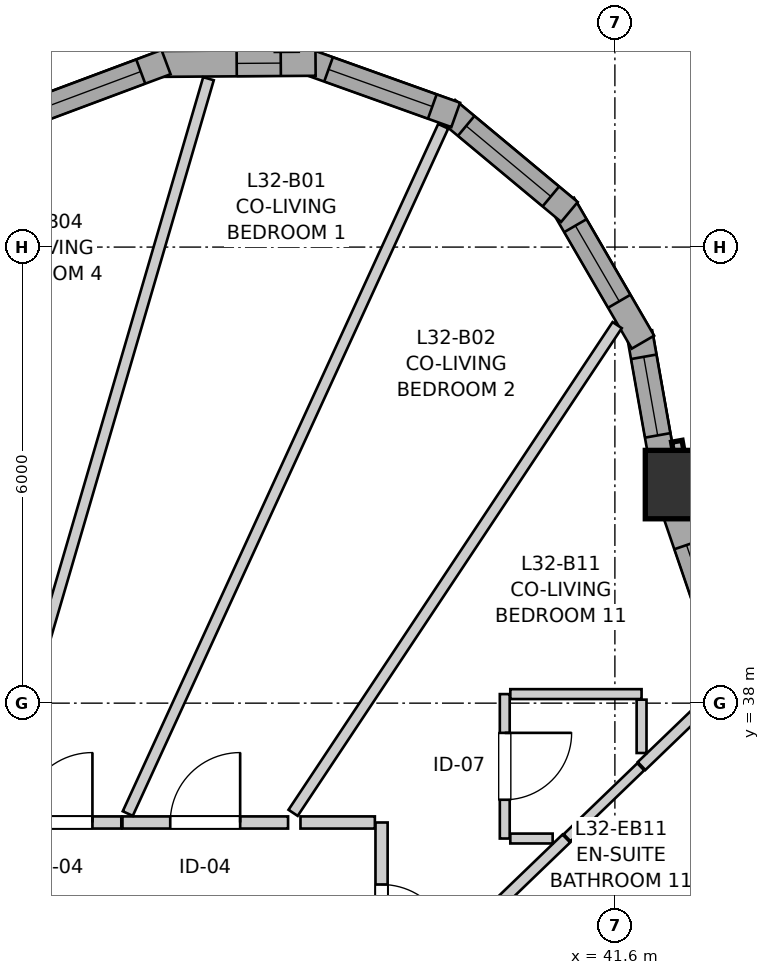
"""IFC4 building model, lengths in metres.
Left out: names, types, materials, properties, quantities, classifications, styles, units other than length and angle.
Written with IfcOpenShell. Run it as: python <this file> out.ifc"""

import sys

from ifc_helpers import new_model, si_unit, direction, frame, frame_2d, origin, origin_2d, place, context, subcontext, project, spatial, rectangle, extrude, source, transform, mapped, element, fill, save


model = new_model("IFC4")
c1 = context("Model", 3, precision=1e-05, world=origin(), true_north=direction((0.0, 1.0)))
c2 = subcontext(c1, "Body", "Model", "MODEL_VIEW")
j1 = project(units=[si_unit("LENGTHUNIT", "METRE"), si_unit("PLANEANGLEUNIT", "RADIAN")], contexts=[c1])
p1 = place(None, origin())
s1 = spatial("IfcSite", under=j1, at=p1, CompositionType="ELEMENT")
p2 = place(p1, origin())
s2 = spatial("IfcBuilding", under=s1, at=p2, CompositionType="ELEMENT")
p3 = place(p2, frame((0.0, 0.0, 108.8)))
s3 = spatial("IfcBuildingStorey", under=s2, at=p3, CompositionType="ELEMENT", Elevation=108.8)
m1 = source(origin(), c2, "Body", "SweptSolid", [
    extrude(rectangle(XDim=0.9, YDim=0.9, at=origin_2d()), origin(), (0.0, 0.0, 1.0), 2.935),
])
p4 = place(p3, frame((42.45, 40.875, 0.0), z_axis=(0.0, 0.0, 1.0), x_axis=(1.0, 0.0, 0.0)))
e1 = element("IfcColumn", 1, at=p4, inside=s3, PredefinedType="COLUMN", context=c2, shape_type="MappedRepresentation", body=[
    mapped(m1, transform((0.0, 0.0, 0.0), x_axis=(1.0, 0.0, 0.0), y_axis=(0.0, 1.0, 0.0), z_axis=(0.0, 0.0, 1.0), scale=1.0)),
])
p5 = place(p3, frame((43.319, 37.809, 0.0), z_axis=(0.0, 0.0, 1.0), x_axis=(-0.323586371726, 0.946198636669, 0.0)))
e2 = element("IfcWall", 2, at=p5, inside=s3, PredefinedType="SOLIDWALL", context=c2, shape_type="SweptSolid", body=[
    extrude(rectangle(XDim=2.952, YDim=0.34, at=frame_2d((1.476, 0.0))), origin(), (0.0, 0.0, 1.0), 2.465),
])
p6 = place(p5, frame((0.949, 0.0, 0.82)))
e3 = element("IfcOpeningElement", 3, at=p6, cuts=e2, PredefinedType="OPENING", context=c2, shape_type="SweptSolid", body=[
    extrude(rectangle(XDim=1.45, YDim=1.25, at=frame_2d((0.725, 0.625))), frame((0.0, 0.18, 0.0), z_axis=(0.0, -1.0, 0.0), x_axis=(1.0, 0.0, 0.0)), (0.0, 0.0, 1.0), 0.36),
])
p7 = place(p3, frame((42.242, 41.072, 0.0), z_axis=(0.0, 0.0, 1.0), x_axis=(-0.17440141227, 0.984674640375, 0.0)))
e4 = element("IfcWall", 4, at=p7, inside=s3, PredefinedType="SOLIDWALL", context=c2, shape_type="SweptSolid", body=[
    extrude(rectangle(XDim=1.831, YDim=0.34, at=frame_2d((0.916, 0.0))), origin(), (0.0, 0.0, 1.0), 2.465),
])
p8 = place(p7, frame((0.457, 0.0, 0.82)))
e5 = element("IfcOpeningElement", 5, at=p8, cuts=e4, PredefinedType="OPENING", context=c2, shape_type="SweptSolid", body=[
    extrude(rectangle(XDim=1.05, YDim=1.45, at=frame_2d((0.525, 0.725))), frame((0.0, 0.18, 0.0), z_axis=(0.0, -1.0, 0.0), x_axis=(1.0, 0.0, 0.0)), (0.0, 0.0, 1.0), 0.36),
])
p9 = place(p3, frame((41.969, 42.749, 0.0), z_axis=(0.0, 0.0, 1.0), x_axis=(-0.501989603552, 0.864873654313, 0.0)))
e6 = element("IfcWall", 6, at=p9, inside=s3, PredefinedType="SOLIDWALL", context=c2, shape_type="SweptSolid", body=[
    extrude(rectangle(XDim=2.099, YDim=0.34, at=frame_2d((1.05, 0.0))), origin(), (0.0, 0.0, 1.0), 2.465),
])
p10 = place(p9, frame((0.622, 0.0, 0.82)))
e7 = element("IfcOpeningElement", 7, at=p10, cuts=e6, PredefinedType="OPENING", context=c2, shape_type="SweptSolid", body=[
    extrude(rectangle(XDim=1.15, YDim=1.2, at=frame_2d((0.575, 0.6))), frame((0.0, 0.18, 0.0), z_axis=(0.0, -1.0, 0.0), x_axis=(1.0, 0.0, 0.0)), (0.0, 0.0, 1.0), 0.36),
])
p11 = place(p3, frame((41.002, 44.462, 0.0), z_axis=(0.0, 0.0, 1.0), x_axis=(-0.768488123124, 0.639864051669, 0.0)))
e8 = element("IfcWall", 8, at=p11, inside=s3, PredefinedType="SOLIDWALL", context=c2, shape_type="SweptSolid", body=[
    extrude(rectangle(XDim=2.099, YDim=0.34, at=frame_2d((1.05, 0.0))), origin(), (0.0, 0.0, 1.0), 2.465),
])
p12 = place(p11, frame((0.319, 0.0, 0.82)))
e9 = element("IfcOpeningElement", 9, at=p12, cuts=e8, PredefinedType="OPENING", context=c2, shape_type="SweptSolid", body=[
    extrude(rectangle(XDim=1.45, YDim=1.25, at=frame_2d((0.725, 0.625))), frame((0.0, 0.18, 0.0), z_axis=(0.0, -1.0, 0.0), x_axis=(1.0, 0.0, 0.0)), (0.0, 0.0, 1.0), 0.36),
])
p13 = place(p3, frame((39.506, 45.739, 0.0), z_axis=(0.0, 0.0, 1.0), x_axis=(-0.941486401639, 0.33705096874, 0.0)))
e10 = element("IfcWall", 10, at=p13, inside=s3, PredefinedType="SOLIDWALL", context=c2, shape_type="SweptSolid", body=[
    extrude(rectangle(XDim=2.099, YDim=0.34, at=frame_2d((1.05, 0.0))), origin(), (0.0, 0.0, 1.0), 2.465),
])
p14 = place(p13, frame((0.327, 0.0, 0.82)))
e11 = element("IfcOpeningElement", 11, at=p14, cuts=e10, PredefinedType="OPENING", context=c2, shape_type="SweptSolid", body=[
    extrude(rectangle(XDim=1.45, YDim=1.25, at=frame_2d((0.725, 0.625))), frame((0.0, 0.18, 0.0), z_axis=(0.0, -1.0, 0.0), x_axis=(1.0, 0.0, 0.0)), (0.0, 0.0, 1.0), 0.36),
])
p15 = place(p3, frame((37.662, 46.424, 0.0), z_axis=(0.0, 0.0, 1.0), x_axis=(-0.999976456891, -0.00686189939, 0.0)))
e12 = element("IfcWall", 12, at=p15, inside=s3, PredefinedType="SOLIDWALL", context=c2, shape_type="SweptSolid", body=[
    extrude(rectangle(XDim=2.099, YDim=0.34, at=frame_2d((1.05, 0.0))), origin(), (0.0, 0.0, 1.0), 2.465),
])
p16 = place(p15, frame((0.458, 0.0, 0.82)))
e13 = element("IfcOpeningElement", 13, at=p16, cuts=e12, PredefinedType="OPENING", context=c2, shape_type="SweptSolid", body=[
    extrude(rectangle(XDim=0.58, YDim=1.35, at=frame_2d((0.29, 0.675))), frame((0.0, 0.18, 0.0), z_axis=(0.0, -1.0, 0.0), x_axis=(1.0, 0.0, 0.0)), (0.0, 0.0, 1.0), 0.36),
])
p17 = place(p3, frame((35.695, 46.434, 0.0), z_axis=(0.0, 0.0, 1.0), x_axis=(-0.9368002254, -0.349864741994, 0.0)))
e14 = element("IfcWall", 14, at=p17, inside=s3, PredefinedType="SOLIDWALL", context=c2, shape_type="SweptSolid", body=[
    extrude(rectangle(XDim=2.041, YDim=0.34, at=frame_2d((1.021, 0.0))), origin(), (0.0, 0.0, 1.0), 2.465),
])
p18 = place(p17, frame((0.355, 0.0, 0.82)))
e15 = element("IfcOpeningElement", 15, at=p18, cuts=e14, PredefinedType="OPENING", context=c2, shape_type="SweptSolid", body=[
    extrude(rectangle(XDim=1.35, YDim=1.45, at=frame_2d((0.675, 0.725))), frame((0.0, 0.18, 0.0), z_axis=(0.0, -1.0, 0.0), x_axis=(1.0, 0.0, 0.0)), (0.0, 0.0, 1.0), 0.36),
])
p19 = place(p3, frame((38.53, 36.43, 0.0), z_axis=(0.0, 0.0, 1.0), x_axis=(0.0, -1.0, 0.0)))
e16 = element("IfcWall", 16, at=p19, inside=s3, PredefinedType="PARTITIONING", context=c2, shape_type="SweptSolid", body=[
    extrude(rectangle(XDim=2.516, YDim=0.16, at=frame_2d((1.258, 0.0))), origin(), (0.0, 0.0, 1.0), 2.573),
])
p20 = place(p19, frame((0.816, 0.0, 0.0)))
e17 = element("IfcOpeningElement", 17, at=p20, cuts=e16, PredefinedType="OPENING", context=c2, shape_type="SweptSolid", body=[
    extrude(rectangle(XDim=0.92, YDim=2.1, at=frame_2d((0.46, 1.05))), frame((0.0, 0.09, 0.0), z_axis=(0.0, -1.0, 0.0), x_axis=(1.0, 0.0, 0.0)), (0.0, 0.0, 1.0), 0.18),
])
p21 = place(p3, frame((35.121, 36.43, 0.0), z_axis=(0.0, 0.0, 1.0), x_axis=(1.0, 0.0, 0.0)))
e18 = element("IfcWall", 18, at=p21, inside=s3, PredefinedType="PARTITIONING", context=c2, shape_type="SweptSolid", body=[
    extrude(rectangle(XDim=2.179, YDim=0.16, at=frame_2d((1.089, 0.0))), origin(), (0.0, 0.0, 1.0), 2.573),
])
p22 = place(p21, frame((0.628, 0.0, 0.0)))
e19 = element("IfcOpeningElement", 19, at=p22, cuts=e18, PredefinedType="OPENING", context=c2, shape_type="SweptSolid", body=[
    extrude(rectangle(XDim=0.92, YDim=2.1, at=frame_2d((0.46, 1.05))), frame((0.0, 0.09, 0.0), z_axis=(0.0, -1.0, 0.0), x_axis=(1.0, 0.0, 0.0)), (0.0, 0.0, 1.0), 0.18),
])
p23 = place(p3, frame((40.151, 38.119, 0.0), z_axis=(0.0, 0.0, 1.0), x_axis=(0.0, -1.0, 0.0)))
e20 = element("IfcWall", 20, at=p23, inside=s3, PredefinedType="PARTITIONING", context=c2, shape_type="SweptSolid", body=[
    extrude(rectangle(XDim=1.9, YDim=0.13, at=frame_2d((0.95, 0.0))), origin(), (0.0, 0.0, 1.0), 2.935),
])
p24 = place(p23, frame((0.51, 0.0, 0.0)))
e21 = element("IfcOpeningElement", 21, at=p24, cuts=e20, PredefinedType="OPENING", context=c2, shape_type="SweptSolid", body=[
    extrude(rectangle(XDim=0.88, YDim=2.05, at=frame_2d((0.44, 1.025))), frame((0.0, 0.075, 0.0), z_axis=(0.0, -1.0, 0.0), x_axis=(1.0, 0.0, 0.0)), (0.0, 0.0, 1.0), 0.15),
])
p25 = place(p3, frame((33.426, 36.43, 0.0), z_axis=(0.0, 0.0, 1.0), x_axis=(1.0, 0.0, 0.0)))
e22 = element("IfcWall", 22, at=p25, inside=s3, PredefinedType="PARTITIONING", context=c2, shape_type="SweptSolid", body=[
    extrude(rectangle(XDim=1.68, YDim=0.16, at=frame_2d((0.84, 0.0))), origin(), (0.0, 0.0, 1.0), 2.935),
])
p26 = place(p25, frame((0.38, 0.0, 0.0)))
e23 = element("IfcOpeningElement", 23, at=p26, cuts=e22, PredefinedType="OPENING", context=c2, shape_type="SweptSolid", body=[
    extrude(rectangle(XDim=0.92, YDim=2.1, at=frame_2d((0.46, 1.05))), frame((0.0, 0.09, 0.0), z_axis=(0.0, -1.0, 0.0), x_axis=(1.0, 0.0, 0.0)), (0.0, 0.0, 1.0), 0.18),
])
p27 = place(p3, frame((33.427, 36.538, 0.0), z_axis=(0.0, 0.0, 1.0), x_axis=(0.280326379037, 0.959904745908, 0.0)))
e24 = element("IfcWall", 24, at=p27, inside=s3, PredefinedType="PARTITIONING", context=c2, shape_type="SweptSolid", body=[
    extrude(rectangle(XDim=10.082, YDim=0.145, at=frame_2d((5.041, 0.0))), origin(), (0.0, 0.0, 1.0), 2.935),
])
p28 = place(p3, frame((35.191, 36.548, 0.0), z_axis=(0.0, 0.0, 1.0), x_axis=(0.417154036681, 0.908835799075, 0.0)))
e25 = element("IfcWall", 25, at=p28, inside=s3, PredefinedType="PARTITIONING", context=c2, shape_type="SweptSolid", body=[
    extrude(rectangle(XDim=9.949, YDim=0.145, at=frame_2d((4.974, 0.0))), origin(), (0.0, 0.0, 1.0), 2.935),
])
p29 = place(p3, frame((37.366, 36.557, 0.0), z_axis=(0.0, 0.0, 1.0), x_axis=(0.553463679146, 0.832873313215, 0.0)))
e26 = element("IfcWall", 26, at=p29, inside=s3, PredefinedType="PARTITIONING", context=c2, shape_type="SweptSolid", body=[
    extrude(rectangle(XDim=7.704, YDim=0.145, at=frame_2d((3.852, 0.0))), origin(), (0.0, 0.0, 1.0), 2.935),
])
p30 = place(p3, frame((38.666, 34.009, 0.0), z_axis=(0.0, 0.0, 1.0), x_axis=(0.72031454127, 0.693647577402, 0.0)))
e27 = element("IfcWall", 27, at=p30, inside=s3, PredefinedType="PARTITIONING", context=c2, shape_type="SweptSolid", body=[
    extrude(rectangle(XDim=3.186, YDim=0.145, at=frame_2d((1.593, 0.0))), origin(), (0.0, 0.0, 1.0), 2.935),
])
p31 = place(p3, frame((40.224, 38.119, 0.0), z_axis=(0.0, 0.0, 1.0), x_axis=(1.0, 0.0, 0.0)))
e28 = element("IfcWall", 28, at=p31, inside=s3, PredefinedType="PARTITIONING", context=c2, shape_type="SweptSolid", body=[
    extrude(rectangle(XDim=1.727, YDim=0.13, at=frame_2d((0.863, 0.0))), origin(), (0.0, 0.0, 1.0), 2.935),
])
p32 = place(p3, frame((41.951, 37.173, 0.0), z_axis=(0.0, 0.0, 1.0), x_axis=(0.720559112487, 0.693393514111, 0.0)))
e29 = element("IfcWall", 29, at=p32, inside=s3, PredefinedType="PARTITIONING", context=c2, shape_type="SweptSolid", body=[
    extrude(rectangle(XDim=1.456, YDim=0.145, at=frame_2d((0.728, 0.0))), origin(), (0.0, 0.0, 1.0), 2.935),
])
p33 = place(p3, frame((40.972, 36.229, 0.0), z_axis=(0.0, 0.0, 1.0), x_axis=(0.72014550452, 0.693823069896, 0.0)))
e30 = element("IfcWall", 30, at=p33, inside=s3, PredefinedType="PARTITIONING", context=c2, shape_type="SweptSolid", body=[
    extrude(rectangle(XDim=1.345, YDim=0.13, at=frame_2d((0.672, 0.0))), origin(), (0.0, 0.0, 1.0), 2.935),
])
p34 = place(p3, frame((37.463, 36.43, 0.0), z_axis=(0.0, 0.0, 1.0), x_axis=(1.0, 0.0, 0.0)))
e31 = element("IfcWall", 31, at=p34, inside=s3, PredefinedType="PARTITIONING", context=c2, shape_type="SweptSolid", body=[
    extrude(rectangle(XDim=0.979, YDim=0.16, at=frame_2d((0.489, 0.0))), origin(), (0.0, 0.0, 1.0), 2.573),
])
p35 = place(p3, frame((41.951, 37.344, 0.0), z_axis=(0.0, 0.0, 1.0), x_axis=(0.0, 1.0, 0.0)))
e32 = element("IfcWall", 32, at=p35, inside=s3, PredefinedType="PARTITIONING", context=c2, shape_type="SweptSolid", body=[
    extrude(rectangle(XDim=0.702, YDim=0.13, at=frame_2d((0.351, 0.0))), origin(), (0.0, 0.0, 1.0), 2.935),
])
p36 = place(p3, frame((40.224, 36.219, 0.0), z_axis=(0.0, 0.0, 1.0), x_axis=(1.0, 0.0, 0.0)))
e33 = element("IfcWall", 33, at=p36, inside=s3, PredefinedType="PARTITIONING", context=c2, shape_type="SweptSolid", body=[
    extrude(rectangle(XDim=0.557, YDim=0.13, at=frame_2d((0.278, 0.0))), origin(), (0.0, 0.0, 1.0), 2.935),
])
m2 = source(origin(), c2, "Body", "SweptSolid", [
    extrude(rectangle(XDim=1.45, YDim=1.25, at=frame_2d((0.725, 0.625))), frame((0.0, 0.03, 0.0), z_axis=(0.0, -1.0, 0.0), x_axis=(1.0, 0.0, 0.0)), (0.0, 0.0, 1.0), 0.06),
])
p37 = place(p6, origin())
e34 = element("IfcWindow", 34, at=p37, inside=s3, PartitioningType="SINGLE_PANEL", PredefinedType="WINDOW", context=c2, shape_type="MappedRepresentation", body=[
    mapped(m2, transform((0.0, 0.0, 0.0), x_axis=(1.0, 0.0, 0.0), y_axis=(0.0, 1.0, 0.0), z_axis=(0.0, 0.0, 1.0), scale=1.0)),
])
fill(e3, e34)
m3 = source(origin(), c2, "Body", "SweptSolid", [
    extrude(rectangle(XDim=1.05, YDim=1.45, at=frame_2d((0.525, 0.725))), frame((0.0, 0.03, 0.0), z_axis=(0.0, -1.0, 0.0), x_axis=(1.0, 0.0, 0.0)), (0.0, 0.0, 1.0), 0.06),
])
p38 = place(p8, origin())
e35 = element("IfcWindow", 35, at=p38, inside=s3, PartitioningType="SINGLE_PANEL", PredefinedType="WINDOW", context=c2, shape_type="MappedRepresentation", body=[
    mapped(m3, transform((0.0, 0.0, 0.0), x_axis=(1.0, 0.0, 0.0), y_axis=(0.0, 1.0, 0.0), z_axis=(0.0, 0.0, 1.0), scale=1.0)),
])
fill(e5, e35)
m4 = source(origin(), c2, "Body", "SweptSolid", [
    extrude(rectangle(XDim=1.15, YDim=1.2, at=frame_2d((0.575, 0.6))), frame((0.0, 0.03, 0.0), z_axis=(0.0, -1.0, 0.0), x_axis=(1.0, 0.0, 0.0)), (0.0, 0.0, 1.0), 0.06),
])
p39 = place(p10, origin())
e36 = element("IfcWindow", 36, at=p39, inside=s3, PartitioningType="SINGLE_PANEL", PredefinedType="WINDOW", context=c2, shape_type="MappedRepresentation", body=[
    mapped(m4, transform((0.0, 0.0, 0.0), x_axis=(1.0, 0.0, 0.0), y_axis=(0.0, 1.0, 0.0), z_axis=(0.0, 0.0, 1.0), scale=1.0)),
])
fill(e7, e36)
p40 = place(p12, origin())
e37 = element("IfcWindow", 37, at=p40, inside=s3, PartitioningType="SINGLE_PANEL", PredefinedType="WINDOW", context=c2, shape_type="MappedRepresentation", body=[
    mapped(m2, transform((0.0, 0.0, 0.0), x_axis=(1.0, 0.0, 0.0), y_axis=(0.0, 1.0, 0.0), z_axis=(0.0, 0.0, 1.0), scale=1.0)),
])
fill(e9, e37)
p41 = place(p14, origin())
e38 = element("IfcWindow", 38, at=p41, inside=s3, PartitioningType="SINGLE_PANEL", PredefinedType="WINDOW", context=c2, shape_type="MappedRepresentation", body=[
    mapped(m2, transform((0.0, 0.0, 0.0), x_axis=(1.0, 0.0, 0.0), y_axis=(0.0, 1.0, 0.0), z_axis=(0.0, 0.0, 1.0), scale=1.0)),
])
fill(e11, e38)
m5 = source(origin(), c2, "Body", "SweptSolid", [
    extrude(rectangle(XDim=0.58, YDim=1.35, at=frame_2d((0.29, 0.675))), frame((0.0, 0.03, 0.0), z_axis=(0.0, -1.0, 0.0), x_axis=(1.0, 0.0, 0.0)), (0.0, 0.0, 1.0), 0.06),
])
p42 = place(p16, origin())
e39 = element("IfcWindow", 39, at=p42, inside=s3, PartitioningType="SINGLE_PANEL", PredefinedType="WINDOW", context=c2, shape_type="MappedRepresentation", body=[
    mapped(m5, transform((0.0, 0.0, 0.0), x_axis=(1.0, 0.0, 0.0), y_axis=(0.0, 1.0, 0.0), z_axis=(0.0, 0.0, 1.0), scale=1.0)),
])
fill(e13, e39)
m6 = source(origin(), c2, "Body", "SweptSolid", [
    extrude(rectangle(XDim=1.35, YDim=1.45, at=frame_2d((0.675, 0.725))), frame((0.0, 0.03, 0.0), z_axis=(0.0, -1.0, 0.0), x_axis=(1.0, 0.0, 0.0)), (0.0, 0.0, 1.0), 0.06),
])
p43 = place(p18, origin())
e40 = element("IfcWindow", 40, at=p43, inside=s3, PartitioningType="SINGLE_PANEL", PredefinedType="WINDOW", context=c2, shape_type="MappedRepresentation", body=[
    mapped(m6, transform((0.0, 0.0, 0.0), x_axis=(1.0, 0.0, 0.0), y_axis=(0.0, 1.0, 0.0), z_axis=(0.0, 0.0, 1.0), scale=1.0)),
])
fill(e15, e40)
m7 = source(origin(), c2, "Body", "SweptSolid", [
    extrude(rectangle(XDim=0.92, YDim=2.1, at=frame_2d((0.46, 1.05))), frame((0.0, 0.025, 0.0), z_axis=(0.0, -1.0, 0.0), x_axis=(1.0, 0.0, 0.0)), (0.0, 0.0, 1.0), 0.05),
])
p44 = place(p20, origin())
e41 = element("IfcDoor", 41, at=p44, inside=s3, OperationType="SINGLE_SWING_RIGHT", PredefinedType="DOOR", context=c2, shape_type="MappedRepresentation", body=[
    mapped(m7, transform((0.0, 0.0, 0.0), x_axis=(1.0, 0.0, 0.0), y_axis=(0.0, 1.0, 0.0), z_axis=(0.0, 0.0, 1.0), scale=1.0)),
])
fill(e17, e41)
p45 = place(p22, origin())
e42 = element("IfcDoor", 42, at=p45, inside=s3, OperationType="SINGLE_SWING_RIGHT", PredefinedType="DOOR", context=c2, shape_type="MappedRepresentation", body=[
    mapped(m7, transform((0.0, 0.0, 0.0), x_axis=(1.0, 0.0, 0.0), y_axis=(0.0, 1.0, 0.0), z_axis=(0.0, 0.0, 1.0), scale=1.0)),
])
fill(e19, e42)
m8 = source(origin(), c2, "Body", "SweptSolid", [
    extrude(rectangle(XDim=0.88, YDim=2.05, at=frame_2d((0.44, 1.025))), frame((0.0, 0.025, 0.0), z_axis=(0.0, -1.0, 0.0), x_axis=(1.0, 0.0, 0.0)), (0.0, 0.0, 1.0), 0.05),
])
p46 = place(p24, origin())
e43 = element("IfcDoor", 43, at=p46, inside=s3, OperationType="SINGLE_SWING_LEFT", PredefinedType="DOOR", context=c2, shape_type="MappedRepresentation", body=[
    mapped(m8, transform((0.0, 0.0, 0.0), x_axis=(1.0, 0.0, 0.0), y_axis=(0.0, 1.0, 0.0), z_axis=(0.0, 0.0, 1.0), scale=1.0)),
])
fill(e21, e43)
p47 = place(p26, origin())
e44 = element("IfcDoor", 44, at=p47, inside=s3, OperationType="SINGLE_SWING_RIGHT", PredefinedType="DOOR", context=c2, shape_type="MappedRepresentation", body=[
    mapped(m7, transform((0.0, 0.0, 0.0), x_axis=(1.0, 0.0, 0.0), y_axis=(0.0, 1.0, 0.0), z_axis=(0.0, 0.0, 1.0), scale=1.0)),
])
fill(e23, e44)
save(model, sys.argv[1])
